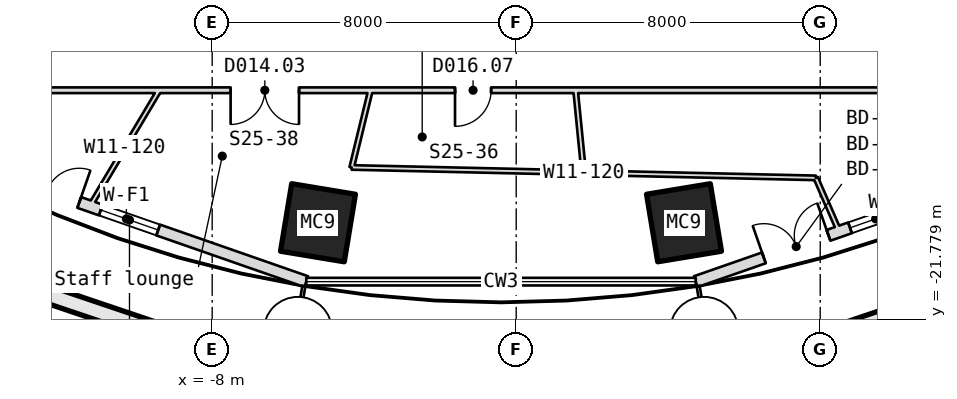
"""IFC4 building model, lengths in metres.
Left out: names, types, materials, properties, quantities, classifications, styles, units other than length and angle.
Written with IfcOpenShell. Run it as: python <this file> out.ifc"""

import sys

from ifc_helpers import new_model, si_unit, direction, frame, frame_2d, origin, origin_2d, place, context, subcontext, project, spatial, rectangle, hollow_rectangle, extrude, element, fill, save


model = new_model("IFC4")
c1 = context("Model", 3, precision=1e-05, world=origin(), true_north=direction((0.0, 1.0)))
c2 = subcontext(c1, "Body", "Model", "MODEL_VIEW")
j1 = project(units=[si_unit("LENGTHUNIT", "METRE"), si_unit("PLANEANGLEUNIT", "RADIAN")], contexts=[c1])
p1 = place(None, origin())
s1 = spatial("IfcSite", under=j1, at=p1, CompositionType="ELEMENT")
p2 = place(p1, origin())
s2 = spatial("IfcBuilding", under=s1, at=p2, CompositionType="ELEMENT")
p3 = place(p2, frame((0.0, 0.0, 359.2)))
s3 = spatial("IfcBuildingStorey", under=s2, at=p3, CompositionType="ELEMENT", Elevation=359.2)
for number, where, z_axis, x_axis in (
    (1, (-5.216, -19.237, -0.18), (0.0, 0.0, 1.0), (-0.987, 0.163, 0.0)),
    (2, (4.416, -19.237, -0.18), (0.0, 0.0, 1.0), (-0.987, -0.163, 0.0)),
):
    element("IfcColumn", number, at=place(p3, frame(where, z_axis=z_axis, x_axis=x_axis)), inside=s3, PredefinedType="COLUMN", context=c2, shape_type="SweptSolid", body=[
        extrude(hollow_rectangle(XDim=1.7, YDim=1.8, WallThickness=0.05, at=origin_2d()), origin(), (0.0, 0.0, 1.0), 4.15),
    ])
p4 = place(p3, frame((-14.992, -17.485, 0.0), z_axis=(0.0, 0.0, 1.0), x_axis=(0.944242611416, -0.329250498535, 0.0)))
e3 = element("IfcWall", 3, at=p4, inside=s3, PredefinedType="SOLIDWALL", context=c2, shape_type="SweptSolid", body=[
    extrude(rectangle(XDim=10.027, YDim=0.3, at=frame_2d((5.014, 0.0))), origin(), (0.0, 0.0, 1.0), 3.97),
])
p5 = place(p4, frame((1.9, 0.0, 0.0)))
e4 = element("IfcOpeningElement", 4, at=p5, cuts=e3, PredefinedType="OPENING", context=c2, shape_type="SweptSolid", body=[
    extrude(rectangle(XDim=1.8, YDim=2.4, at=frame_2d((0.9, 1.2))), frame((0.0, 0.16, 0.0), z_axis=(0.0, -1.0, 0.0), x_axis=(1.0, 0.0, 0.0)), (0.0, 0.0, 1.0), 0.32),
])
p6 = place(p4, frame((4.3, 0.0, 0.9)))
e5 = element("IfcOpeningElement", 5, at=p6, cuts=e3, PredefinedType="OPENING", context=c2, shape_type="SweptSolid", body=[
    extrude(rectangle(XDim=1.6, YDim=1.5, at=frame_2d((0.8, 0.75))), frame((0.0, 0.16, 0.0), z_axis=(0.0, -1.0, 0.0), x_axis=(1.0, 0.0, 0.0)), (0.0, 0.0, 1.0), 0.32),
])
p7 = place(p3, frame((4.724, -20.786, 0.0), z_axis=(0.0, 0.0, 1.0), x_axis=(0.944239971919, 0.329258068133, 0.0)))
e6 = element("IfcWall", 6, at=p7, inside=s3, PredefinedType="SOLIDWALL", context=c2, shape_type="SweptSolid", body=[
    extrude(rectangle(XDim=10.027, YDim=0.3, at=frame_2d((5.014, 0.0))), origin(), (0.0, 0.0, 1.0), 3.97),
])
p8 = place(p7, frame((1.9, 0.0, 0.0)))
e7 = element("IfcOpeningElement", 7, at=p8, cuts=e6, PredefinedType="OPENING", context=c2, shape_type="SweptSolid", body=[
    extrude(rectangle(XDim=1.8, YDim=2.4, at=frame_2d((0.9, 1.2))), frame((0.0, 0.16, 0.0), z_axis=(0.0, -1.0, 0.0), x_axis=(1.0, 0.0, 0.0)), (0.0, 0.0, 1.0), 0.32),
])
p9 = place(p7, frame((4.3, 0.0, 0.9)))
e8 = element("IfcOpeningElement", 8, at=p9, cuts=e6, PredefinedType="OPENING", context=c2, shape_type="SweptSolid", body=[
    extrude(rectangle(XDim=1.6, YDim=1.5, at=frame_2d((0.8, 0.75))), frame((0.0, 0.16, 0.0), z_axis=(0.0, -1.0, 0.0), x_axis=(1.0, 0.0, 0.0)), (0.0, 0.0, 1.0), 0.32),
])
p10 = place(p3, frame((-9.395, -15.75, 0.0), z_axis=(0.0, 0.0, 1.0), x_axis=(-0.512250738002, -0.858835945578, 0.0)))
e9 = element("IfcWall", 9, at=p10, inside=s3, PredefinedType="PARTITIONING", context=c2, shape_type="SweptSolid", body=[
    extrude(rectangle(XDim=3.553, YDim=0.12, at=frame_2d((1.776, 0.0))), origin(), (0.0, 0.0, 1.0), 3.97),
])
p11 = place(p3, frame((-4.329, -17.781, 0.0), z_axis=(0.0, 0.0, 1.0), x_axis=(0.999747193502, -0.02248441871, 0.0)))
e10 = element("IfcWall", 10, at=p11, inside=s3, PredefinedType="PARTITIONING", context=c2, shape_type="SweptSolid", body=[
    extrude(rectangle(XDim=12.216, YDim=0.12, at=frame_2d((6.108, 0.0))), origin(), (0.0, 0.0, 1.0), 3.97),
])
p12 = place(p3, frame((-4.329, -17.781, 0.0), z_axis=(0.0, 0.0, 1.0), x_axis=(0.236595923388, 0.971608135534, 0.0)))
e11 = element("IfcWall", 11, at=p12, inside=s3, PredefinedType="PARTITIONING", context=c2, shape_type="SweptSolid", body=[
    extrude(rectangle(XDim=2.091, YDim=0.12, at=frame_2d((1.045, 0.0))), origin(), (0.0, 0.0, 1.0), 3.97),
])
p13 = place(p3, frame((1.778, -17.919, 0.0), z_axis=(0.0, 0.0, 1.0), x_axis=(-0.098694000634, 0.995117829324, 0.0)))
e12 = element("IfcWall", 12, at=p13, inside=s3, PredefinedType="PARTITIONING", context=c2, shape_type="SweptSolid", body=[
    extrude(rectangle(XDim=2.179, YDim=0.12, at=frame_2d((1.09, 0.0))), origin(), (0.0, 0.0, 1.0), 3.97),
])
p14 = place(p3, frame((7.884, -18.056, 0.0), z_axis=(0.0, 0.0, 1.0), x_axis=(0.400253967032, -0.916404256797, 0.0)))
e13 = element("IfcWall", 13, at=p14, inside=s3, PredefinedType="PARTITIONING", context=c2, shape_type="SweptSolid", body=[
    extrude(rectangle(XDim=1.542, YDim=0.12, at=frame_2d((0.771, 0.0))), origin(), (0.0, 0.0, 1.0), 3.97),
])
p15 = place(p3, frame((12.116, -15.75, 0.0), z_axis=(0.0, 0.0, 1.0), x_axis=(-1.0, 0.0, 0.0)))
e14 = element("IfcWall", 14, at=p15, inside=s3, PredefinedType="PARTITIONING", context=c2, shape_type="SweptSolid", body=[
    extrude(rectangle(XDim=25.032, YDim=0.15, at=frame_2d((12.516, 0.0))), origin(), (0.0, 0.0, 1.0), 3.97),
])
p16 = place(p15, frame((12.776, 0.0, 0.0)))
e15 = element("IfcOpeningElement", 15, at=p16, cuts=e14, PredefinedType="OPENING", context=c2, shape_type="SweptSolid", body=[
    extrude(rectangle(XDim=0.95, YDim=2.1, at=frame_2d((0.475, 1.05))), frame((0.0, 0.085, 0.0), z_axis=(0.0, -1.0, 0.0), x_axis=(1.0, 0.0, 0.0)), (0.0, 0.0, 1.0), 0.17),
])
p17 = place(p15, frame((17.831, 0.0, 0.0)))
e16 = element("IfcOpeningElement", 16, at=p17, cuts=e14, PredefinedType="OPENING", context=c2, shape_type="SweptSolid", body=[
    extrude(rectangle(XDim=1.8, YDim=2.1, at=frame_2d((0.9, 1.05))), frame((0.0, 0.085, 0.0), z_axis=(0.0, -1.0, 0.0), x_axis=(1.0, 0.0, 0.0)), (0.0, 0.0, 1.0), 0.17),
])
p18 = place(p5, origin())
e17 = element("IfcDoor", 17, at=p18, inside=s3, OperationType="SINGLE_SWING_LEFT", PredefinedType="DOOR", context=c2, shape_type="SweptSolid", body=[
    extrude(rectangle(XDim=1.8, YDim=2.4, at=frame_2d((0.9, 1.2))), frame((0.0, 0.025, 0.0), z_axis=(0.0, -1.0, 0.0), x_axis=(1.0, 0.0, 0.0)), (0.0, 0.0, 1.0), 0.05),
])
fill(e4, e17)
p19 = place(p6, origin())
e18 = element("IfcWindow", 18, at=p19, inside=s3, PartitioningType="SINGLE_PANEL", PredefinedType="WINDOW", context=c2, shape_type="SweptSolid", body=[
    extrude(rectangle(XDim=1.6, YDim=1.5, at=frame_2d((0.8, 0.75))), frame((0.0, 0.03, 0.0), z_axis=(0.0, -1.0, 0.0), x_axis=(1.0, 0.0, 0.0)), (0.0, 0.0, 1.0), 0.06),
])
fill(e5, e18)
p20 = place(p8, origin())
e19 = element("IfcDoor", 19, at=p20, inside=s3, OperationType="SINGLE_SWING_LEFT", PredefinedType="DOOR", context=c2, shape_type="SweptSolid", body=[
    extrude(rectangle(XDim=1.8, YDim=2.4, at=frame_2d((0.9, 1.2))), frame((0.0, 0.025, 0.0), z_axis=(0.0, -1.0, 0.0), x_axis=(1.0, 0.0, 0.0)), (0.0, 0.0, 1.0), 0.05),
])
fill(e7, e19)
p21 = place(p9, origin())
e20 = element("IfcWindow", 20, at=p21, inside=s3, PartitioningType="SINGLE_PANEL", PredefinedType="WINDOW", context=c2, shape_type="SweptSolid", body=[
    extrude(rectangle(XDim=1.6, YDim=1.5, at=frame_2d((0.8, 0.75))), frame((0.0, 0.03, 0.0), z_axis=(0.0, -1.0, 0.0), x_axis=(1.0, 0.0, 0.0)), (0.0, 0.0, 1.0), 0.06),
])
fill(e8, e20)
p22 = place(p16, origin())
e21 = element("IfcDoor", 21, at=p22, inside=s3, OperationType="SINGLE_SWING_RIGHT", PredefinedType="DOOR", context=c2, shape_type="SweptSolid", body=[
    extrude(rectangle(XDim=0.95, YDim=2.1, at=frame_2d((0.475, 1.05))), frame((0.0, 0.025, 0.0), z_axis=(0.0, -1.0, 0.0), x_axis=(1.0, 0.0, 0.0)), (0.0, 0.0, 1.0), 0.05),
])
fill(e15, e21)
p23 = place(p17, origin())
e22 = element("IfcDoor", 22, at=p23, inside=s3, OperationType="DOUBLE_DOOR_SINGLE_SWING", PredefinedType="DOOR", context=c2, shape_type="SweptSolid", body=[
    extrude(rectangle(XDim=1.8, YDim=2.1, at=frame_2d((0.9, 1.05))), frame((0.0, 0.025, 0.0), z_axis=(0.0, -1.0, 0.0), x_axis=(1.0, 0.0, 0.0)), (0.0, 0.0, 1.0), 0.05),
])
fill(e16, e22)
save(model, sys.argv[1])
